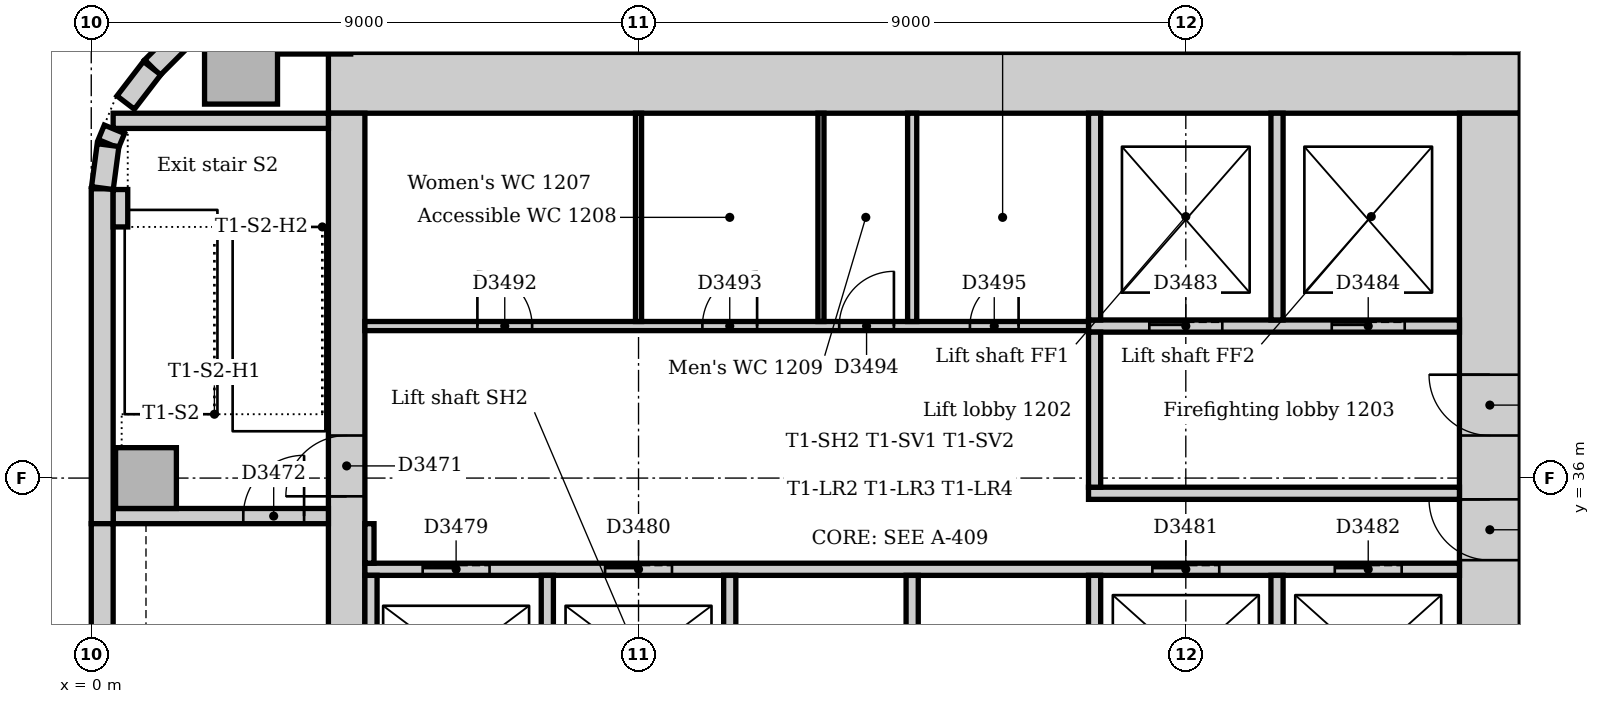
"""IFC4 building model, lengths in metres.
Left out: names, types, materials, properties, quantities, classifications, styles, units other than length and angle.
Written with IfcOpenShell. Run it as: python <this file> out.ifc"""

import sys

from ifc_helpers import new_model, si_unit, direction, frame, frame_2d, origin, origin_2d, place, context, subcontext, project, spatial, rectangle, extrude, element, fill, save


model = new_model("IFC4")
c1 = context("Model", 3, precision=1e-05, world=origin(), true_north=direction((0.0, 1.0)))
c2 = subcontext(c1, "Body", "Model", "MODEL_VIEW")
j1 = project(units=[si_unit("LENGTHUNIT", "METRE"), si_unit("PLANEANGLEUNIT", "RADIAN")], contexts=[c1])
p1 = place(None, origin())
s1 = spatial("IfcSite", under=j1, at=p1, CompositionType="ELEMENT")
p2 = place(p1, origin())
s2 = spatial("IfcBuilding", under=s1, at=p2, CompositionType="ELEMENT")
p3 = place(p2, frame((0.0, 0.0, 55.0)))
s3 = spatial("IfcBuildingStorey", under=s2, at=p3, CompositionType="ELEMENT", Elevation=55.0)
p4 = place(p3, frame((23.5, 42.5, 0.0), z_axis=(0.0, 0.0, 1.0), x_axis=(-1.0, 0.0, 0.0)))
e1 = element("IfcWall", 1, at=p4, inside=s3, PredefinedType="SOLIDWALL", context=c2, shape_type="SweptSolid", body=[
    extrude(rectangle(XDim=19.6, YDim=1.0, at=frame_2d((9.8, 0.0))), origin(), (0.0, 0.0, 1.0), 4.0),
])
p5 = place(p3, frame((23.0, 31.5, 0.0), z_axis=(0.0, 0.0, 1.0), x_axis=(0.0, 1.0, 0.0)))
e2 = element("IfcWall", 2, at=p5, inside=s3, PredefinedType="SOLIDWALL", context=c2, shape_type="SweptSolid", body=[
    extrude(rectangle(XDim=10.5, YDim=1.0, at=frame_2d((5.25, 0.0))), origin(), (0.0, 0.0, 1.0), 4.0),
])
p6 = place(p5, frame((3.15, 0.0, 0.0)))
e3 = element("IfcOpeningElement", 3, at=p6, cuts=e2, PredefinedType="OPENING", context=c2, shape_type="SweptSolid", body=[
    extrude(rectangle(XDim=1.0, YDim=2.1, at=frame_2d((0.5, 1.05))), frame((0.0, 0.51, 0.0), z_axis=(0.0, -1.0, 0.0), x_axis=(1.0, 0.0, 0.0)), (0.0, 0.0, 1.0), 1.02),
])
p7 = place(p5, frame((5.2, 0.0, 0.0)))
e4 = element("IfcOpeningElement", 4, at=p7, cuts=e2, PredefinedType="OPENING", context=c2, shape_type="SweptSolid", body=[
    extrude(rectangle(XDim=1.0, YDim=2.1, at=frame_2d((0.5, 1.05))), frame((0.0, 0.51, 0.0), z_axis=(0.0, -1.0, 0.0), x_axis=(1.0, 0.0, 0.0)), (0.0, 0.0, 1.0), 1.02),
])
p8 = place(p3, frame((4.2, 42.0, 0.0), z_axis=(0.0, 0.0, 1.0), x_axis=(0.0, -1.0, 0.0)))
e5 = element("IfcWall", 5, at=p8, inside=s3, PredefinedType="SOLIDWALL", context=c2, shape_type="SweptSolid", body=[
    extrude(rectangle(XDim=10.5, YDim=0.6, at=frame_2d((5.25, 0.0))), origin(), (0.0, 0.0, 1.0), 4.0),
])
p9 = place(p8, frame((5.3, 0.0, 0.0)))
e6 = element("IfcOpeningElement", 6, at=p9, cuts=e5, PredefinedType="OPENING", context=c2, shape_type="SweptSolid", body=[
    extrude(rectangle(XDim=1.0, YDim=2.1, at=frame_2d((0.5, 1.05))), frame((0.0, 0.31, 0.0), z_axis=(0.0, -1.0, 0.0), x_axis=(1.0, 0.0, 0.0)), (0.0, 0.0, 1.0), 0.62),
])
p10 = place(p3, frame((0.36, 35.375, 0.0), z_axis=(0.0, 0.0, 1.0), x_axis=(1.0, 0.0, 0.0)))
e7 = element("IfcWall", 7, at=p10, inside=s3, PredefinedType="SOLIDWALL", context=c2, shape_type="SweptSolid", body=[
    extrude(rectangle(XDim=3.54, YDim=0.25, at=frame_2d((1.77, 0.0))), origin(), (0.0, 0.0, 1.0), 4.0),
])
p11 = place(p10, frame((2.14, 0.0, 0.0)))
e8 = element("IfcOpeningElement", 8, at=p11, cuts=e7, PredefinedType="OPENING", context=c2, shape_type="SweptSolid", body=[
    extrude(rectangle(XDim=1.0, YDim=2.1, at=frame_2d((0.5, 1.05))), frame((0.0, 0.135, 0.0), z_axis=(0.0, -1.0, 0.0), x_axis=(1.0, 0.0, 0.0)), (0.0, 0.0, 1.0), 0.27),
])
p12 = place(p3, frame((3.9, 41.875, 0.0), z_axis=(0.0, 0.0, 1.0), x_axis=(-1.0, 0.0, 0.0)))
e9 = element("IfcWall", 9, at=p12, inside=s3, PredefinedType="SOLIDWALL", context=c2, shape_type="SweptSolid", body=[
    extrude(rectangle(XDim=3.54, YDim=0.25, at=frame_2d((1.77, 0.0))), origin(), (0.0, 0.0, 1.0), 4.0),
])
for number, where, z_axis, x_axis in (
    (10, (3.667, 43.574, 0.0), (0.0, 0.0, 1.0), (1.0, 0.0, 0.0)),
    (11, (2.463, 42.75, 0.0), (0.0, 0.0, 1.0), (1.0, 0.0, 0.0)),
):
    element("IfcColumn", number, at=place(p3, frame(where, z_axis=z_axis, x_axis=x_axis)), inside=s3, PredefinedType="COLUMN", context=c2, shape_type="SweptSolid", body=[
        extrude(rectangle(XDim=1.2, YDim=1.2, at=origin_2d()), origin(), (0.0, 0.0, 1.0), 3.85),
    ])
p13 = place(p3, frame((0.9, 36.0, 0.0), z_axis=(0.0, 0.0, 1.0), x_axis=(1.0, 0.0, 0.0)))
e12 = element("IfcColumn", 12, at=p13, inside=s3, PredefinedType="COLUMN", context=c2, shape_type="SweptSolid", body=[
    extrude(rectangle(XDim=1.0, YDim=1.0, at=origin_2d()), origin(), (0.0, 0.0, 1.0), 4.0),
])
p14 = place(p3, frame((2.249, 43.994, 0.0), z_axis=(0.0, 0.0, 1.0), x_axis=(-0.707106781187, -0.707106781187, 0.0)))
e13 = element("IfcWall", 13, at=p14, inside=s3, PredefinedType="STANDARD", context=c2, shape_type="SweptSolid", body=[
    extrude(rectangle(XDim=1.757, YDim=0.36, at=frame_2d((0.879, 0.0))), origin(), (0.0, 0.0, 1.0), 3.85),
])
p15 = place(p3, frame((0.18, 40.757, 0.0), z_axis=(0.0, 0.0, 1.0), x_axis=(0.0, -1.0, 0.0)))
e14 = element("IfcWall", 14, at=p15, inside=s3, PredefinedType="STANDARD", context=c2, shape_type="SweptSolid", body=[
    extrude(rectangle(XDim=5.507, YDim=0.36, at=frame_2d((2.754, 0.0))), origin(), (0.0, 0.0, 1.0), 3.85),
])
p16 = place(p3, frame((0.18, 35.25, 0.0), z_axis=(0.0, 0.0, 1.0), x_axis=(0.0, -1.0, 0.0)))
e15 = element("IfcWall", 15, at=p16, inside=s3, PredefinedType="STANDARD", context=c2, shape_type="SweptSolid", body=[
    extrude(rectangle(XDim=7.5, YDim=0.36, at=frame_2d((3.75, 0.0))), origin(), (0.0, 0.0, 1.0), 3.85),
])
p17 = place(p3, frame((1.0, 42.741, 0.0), z_axis=(0.0, 0.0, 1.0), x_axis=(-0.608802368033, -0.793321924995, 0.0)))
e16 = element("IfcWall", 16, at=p17, inside=s3, PredefinedType="STANDARD", context=c2, shape_type="SweptSolid", body=[
    extrude(rectangle(XDim=0.713, YDim=0.36, at=frame_2d((0.357, 0.0))), origin(), (0.0, 0.0, 1.0), 3.85),
])
p18 = place(p3, frame((0.381, 41.736, 0.0), z_axis=(0.0, 0.0, 1.0), x_axis=(-0.382773360986, -0.923842277729, 0.0)))
e17 = element("IfcWall", 17, at=p18, inside=s3, PredefinedType="STANDARD", context=c2, shape_type="SweptSolid", body=[
    extrude(rectangle(XDim=0.258, YDim=0.36, at=frame_2d((0.129, 0.0))), origin(), (0.0, 0.0, 1.0), 3.85),
])
p19 = place(p3, frame((0.276, 41.476, 0.0), z_axis=(0.0, 0.0, 1.0), x_axis=(-0.13055608231, -0.99144092581, 0.0)))
e18 = element("IfcWall", 18, at=p19, inside=s3, PredefinedType="STANDARD", context=c2, shape_type="SweptSolid", body=[
    extrude(rectangle(XDim=0.713, YDim=0.36, at=frame_2d((0.356, 0.0))), origin(), (0.0, 0.0, 1.0), 3.85),
])
p20 = place(p3, frame((0.48, 40.13, 0.0), z_axis=(0.0, 0.0, 1.0), x_axis=(0.0, 1.0, 0.0)))
e19 = element("IfcWall", 19, at=p20, inside=s3, PredefinedType="STANDARD", context=c2, shape_type="SweptSolid", body=[
    extrude(rectangle(XDim=0.615, YDim=0.24, at=frame_2d((0.307, 0.0))), origin(), (0.0, 0.0, 1.0), 4.0),
])
p21 = place(p3, frame((16.4, 35.75, 0.0), z_axis=(0.0, 0.0, 1.0), x_axis=(1.0, 0.0, 0.0)))
e20 = element("IfcWall", 20, at=p21, inside=s3, PredefinedType="PARTITIONING", context=c2, shape_type="SweptSolid", body=[
    extrude(rectangle(XDim=6.1, YDim=0.2, at=frame_2d((3.05, 0.0))), origin(), (0.0, 0.0, 1.0), 3.85),
])
p22 = place(p3, frame((16.4, 38.5, 0.0), z_axis=(0.0, 0.0, 1.0), x_axis=(1.0, 0.0, 0.0)))
e21 = element("IfcWall", 21, at=p22, inside=s3, PredefinedType="PARTITIONING", context=c2, shape_type="SweptSolid", body=[
    extrude(rectangle(XDim=6.1, YDim=0.2, at=frame_2d((3.05, 0.0))), origin(), (0.0, 0.0, 1.0), 3.85),
])
p23 = place(p22, frame((1.0, 0.0, 0.0)))
e22 = element("IfcOpeningElement", 22, at=p23, cuts=e21, PredefinedType="OPENING", context=c2, shape_type="SweptSolid", body=[
    extrude(rectangle(XDim=1.2, YDim=2.1, at=frame_2d((0.6, 1.05))), frame((0.0, 0.11, 0.0), z_axis=(0.0, -1.0, 0.0), x_axis=(1.0, 0.0, 0.0)), (0.0, 0.0, 1.0), 0.22),
])
p24 = place(p22, frame((4.0, 0.0, 0.0)))
e23 = element("IfcOpeningElement", 23, at=p24, cuts=e21, PredefinedType="OPENING", context=c2, shape_type="SweptSolid", body=[
    extrude(rectangle(XDim=1.2, YDim=2.1, at=frame_2d((0.6, 1.05))), frame((0.0, 0.11, 0.0), z_axis=(0.0, -1.0, 0.0), x_axis=(1.0, 0.0, 0.0)), (0.0, 0.0, 1.0), 0.22),
])
p25 = place(p3, frame((16.5, 35.85, 0.0), z_axis=(0.0, 0.0, 1.0), x_axis=(0.0, 1.0, 0.0)))
e24 = element("IfcWall", 24, at=p25, inside=s3, PredefinedType="PARTITIONING", context=c2, shape_type="SweptSolid", body=[
    extrude(rectangle(XDim=2.55, YDim=0.2, at=frame_2d((1.275, 0.0))), origin(), (0.0, 0.0, 1.0), 3.85),
])
p26 = place(p3, frame((4.5, 34.5, 0.0), z_axis=(0.0, 0.0, 1.0), x_axis=(1.0, 0.0, 0.0)))
e25 = element("IfcWall", 25, at=p26, inside=s3, PredefinedType="PARTITIONING", context=c2, shape_type="SweptSolid", body=[
    extrude(rectangle(XDim=18.0, YDim=0.2, at=frame_2d((9.0, 0.0))), origin(), (0.0, 0.0, 1.0), 3.85),
])
p27 = place(p26, frame((0.95, 0.0, 0.0)))
e26 = element("IfcOpeningElement", 26, at=p27, cuts=e25, PredefinedType="OPENING", context=c2, shape_type="SweptSolid", body=[
    extrude(rectangle(XDim=1.1, YDim=2.1, at=frame_2d((0.55, 1.05))), frame((0.0, 0.11, 0.0), z_axis=(0.0, -1.0, 0.0), x_axis=(1.0, 0.0, 0.0)), (0.0, 0.0, 1.0), 0.22),
])
p28 = place(p26, frame((3.95, 0.0, 0.0)))
e27 = element("IfcOpeningElement", 27, at=p28, cuts=e25, PredefinedType="OPENING", context=c2, shape_type="SweptSolid", body=[
    extrude(rectangle(XDim=1.1, YDim=2.1, at=frame_2d((0.55, 1.05))), frame((0.0, 0.11, 0.0), z_axis=(0.0, -1.0, 0.0), x_axis=(1.0, 0.0, 0.0)), (0.0, 0.0, 1.0), 0.22),
])
p29 = place(p26, frame((12.95, 0.0, 0.0)))
e28 = element("IfcOpeningElement", 28, at=p29, cuts=e25, PredefinedType="OPENING", context=c2, shape_type="SweptSolid", body=[
    extrude(rectangle(XDim=1.1, YDim=2.1, at=frame_2d((0.55, 1.05))), frame((0.0, 0.11, 0.0), z_axis=(0.0, -1.0, 0.0), x_axis=(1.0, 0.0, 0.0)), (0.0, 0.0, 1.0), 0.22),
])
p30 = place(p26, frame((15.95, 0.0, 0.0)))
e29 = element("IfcOpeningElement", 29, at=p30, cuts=e25, PredefinedType="OPENING", context=c2, shape_type="SweptSolid", body=[
    extrude(rectangle(XDim=1.1, YDim=2.1, at=frame_2d((0.55, 1.05))), frame((0.0, 0.11, 0.0), z_axis=(0.0, -1.0, 0.0), x_axis=(1.0, 0.0, 0.0)), (0.0, 0.0, 1.0), 0.22),
])
for number, where, z_axis, x_axis in (
    (30, (16.5, 38.6, 0.0), (0.0, 0.0, 1.0), (0.0, 1.0, 0.0)),
    (31, (19.5, 38.6, 0.0), (0.0, 0.0, 1.0), (0.0, 1.0, 0.0)),
):
    element("IfcWall", number, at=place(p3, frame(where, z_axis=z_axis, x_axis=x_axis)), inside=s3, PredefinedType="PARTITIONING", context=c2, shape_type="SweptSolid", body=[
        extrude(rectangle(XDim=3.4, YDim=0.2, at=frame_2d((1.7, 0.0))), origin(), (0.0, 0.0, 1.0), 3.85),
    ])
for number, where, z_axis, x_axis in (
    (32, (4.6, 31.75, 0.0), (0.0, 0.0, 1.0), (0.0, 1.0, 0.0)),
    (33, (7.5, 31.75, 0.0), (0.0, 0.0, 1.0), (0.0, 1.0, 0.0)),
    (34, (10.5, 31.75, 0.0), (0.0, 0.0, 1.0), (0.0, 1.0, 0.0)),
    (35, (13.5, 31.75, 0.0), (0.0, 0.0, 1.0), (0.0, 1.0, 0.0)),
    (36, (16.5, 31.75, 0.0), (0.0, 0.0, 1.0), (0.0, 1.0, 0.0)),
    (37, (19.5, 31.75, 0.0), (0.0, 0.0, 1.0), (0.0, 1.0, 0.0)),
):
    element("IfcWall", number, at=place(p3, frame(where, z_axis=z_axis, x_axis=x_axis)), inside=s3, PredefinedType="PARTITIONING", context=c2, shape_type="SweptSolid", body=[
        extrude(rectangle(XDim=2.65, YDim=0.2, at=frame_2d((1.325, 0.0))), origin(), (0.0, 0.0, 1.0), 3.85),
    ])
p31 = place(p3, frame((4.5, 38.5, 0.0), z_axis=(0.0, 0.0, 1.0), x_axis=(1.0, 0.0, 0.0)))
e38 = element("IfcWall", 38, at=p31, inside=s3, PredefinedType="PARTITIONING", context=c2, shape_type="SweptSolid", body=[
    extrude(rectangle(XDim=11.9, YDim=0.15, at=frame_2d((5.95, 0.0))), origin(), (0.0, 0.0, 1.0), 3.85),
])
p32 = place(p31, frame((1.85, 0.0, 0.0)))
e39 = element("IfcOpeningElement", 39, at=p32, cuts=e38, PredefinedType="OPENING", context=c2, shape_type="SweptSolid", body=[
    extrude(rectangle(XDim=0.9, YDim=2.1, at=frame_2d((0.45, 1.05))), frame((0.0, 0.085, 0.0), z_axis=(0.0, -1.0, 0.0), x_axis=(1.0, 0.0, 0.0)), (0.0, 0.0, 1.0), 0.17),
])
p33 = place(p31, frame((5.55, 0.0, 0.0)))
e40 = element("IfcOpeningElement", 40, at=p33, cuts=e38, PredefinedType="OPENING", context=c2, shape_type="SweptSolid", body=[
    extrude(rectangle(XDim=0.9, YDim=2.1, at=frame_2d((0.45, 1.05))), frame((0.0, 0.085, 0.0), z_axis=(0.0, -1.0, 0.0), x_axis=(1.0, 0.0, 0.0)), (0.0, 0.0, 1.0), 0.17),
])
p34 = place(p31, frame((7.8, 0.0, 0.0)))
e41 = element("IfcOpeningElement", 41, at=p34, cuts=e38, PredefinedType="OPENING", context=c2, shape_type="SweptSolid", body=[
    extrude(rectangle(XDim=0.9, YDim=2.1, at=frame_2d((0.45, 1.05))), frame((0.0, 0.085, 0.0), z_axis=(0.0, -1.0, 0.0), x_axis=(1.0, 0.0, 0.0)), (0.0, 0.0, 1.0), 0.17),
])
p35 = place(p31, frame((9.95, 0.0, 0.0)))
e42 = element("IfcOpeningElement", 42, at=p35, cuts=e38, PredefinedType="OPENING", context=c2, shape_type="SweptSolid", body=[
    extrude(rectangle(XDim=0.8, YDim=2.1, at=frame_2d((0.4, 1.05))), frame((0.0, 0.085, 0.0), z_axis=(0.0, -1.0, 0.0), x_axis=(1.0, 0.0, 0.0)), (0.0, 0.0, 1.0), 0.17),
])
p36 = place(p3, frame((4.575, 34.6, 0.0), z_axis=(0.0, 0.0, 1.0), x_axis=(0.0, 1.0, 0.0)))
e43 = element("IfcWall", 43, at=p36, inside=s3, PredefinedType="PARTITIONING", context=c2, shape_type="SweptSolid", body=[
    extrude(rectangle(XDim=0.65, YDim=0.15, at=frame_2d((0.325, 0.0))), origin(), (0.0, 0.0, 1.0), 3.85),
])
p37 = place(p3, frame((13.5, 38.575, 0.0), z_axis=(0.0, 0.0, 1.0), x_axis=(0.0, 1.0, 0.0)))
e44 = element("IfcWall", 44, at=p37, inside=s3, PredefinedType="PARTITIONING", context=c2, shape_type="SweptSolid", body=[
    extrude(rectangle(XDim=3.425, YDim=0.15, at=frame_2d((1.712, 0.0))), origin(), (0.0, 0.0, 1.0), 3.85),
])
for number, where, z_axis, x_axis in (
    (45, (9.0, 38.575, 0.0), (0.0, 0.0, 1.0), (0.0, 1.0, 0.0)),
    (46, (12.0, 38.575, 0.0), (0.0, 0.0, 1.0), (0.0, 1.0, 0.0)),
):
    element("IfcWall", number, at=place(p3, frame(where, z_axis=z_axis, x_axis=x_axis)), inside=s3, PredefinedType="PARTITIONING", context=c2, shape_type="SweptSolid", body=[
        extrude(rectangle(XDim=3.425, YDim=0.1, at=frame_2d((1.712, 0.0))), origin(), (0.0, 0.0, 1.0), 3.85),
    ])
p38 = place(p9, frame((1.0, 0.0, 0.0), z_axis=(0.0, 0.0, 1.0), x_axis=(-1.0, 0.0, 0.0)))
e47 = element("IfcDoor", 47, at=p38, inside=s3, OperationType="SINGLE_SWING_LEFT", PredefinedType="DOOR", context=c2, shape_type="SweptSolid", body=[
    extrude(rectangle(XDim=1.0, YDim=2.1, at=frame_2d((0.5, 1.05))), frame((0.0, 0.025, 0.0), z_axis=(0.0, -1.0, 0.0), x_axis=(1.0, 0.0, 0.0)), (0.0, 0.0, 1.0), 0.05),
])
fill(e6, e47)
p39 = place(p11, origin())
e48 = element("IfcDoor", 48, at=p39, inside=s3, OperationType="SINGLE_SWING_RIGHT", PredefinedType="DOOR", context=c2, shape_type="SweptSolid", body=[
    extrude(rectangle(XDim=1.0, YDim=2.1, at=frame_2d((0.5, 1.05))), frame((0.0, 0.025, 0.0), z_axis=(0.0, -1.0, 0.0), x_axis=(1.0, 0.0, 0.0)), (0.0, 0.0, 1.0), 0.05),
])
fill(e8, e48)
p40 = place(p27, origin())
e49 = element("IfcDoor", 49, at=p40, inside=s3, OperationType="SLIDING_TO_LEFT", PredefinedType="DOOR", context=c2, shape_type="SweptSolid", body=[
    extrude(rectangle(XDim=1.1, YDim=2.1, at=frame_2d((0.55, 1.05))), frame((0.0, 0.025, 0.0), z_axis=(0.0, -1.0, 0.0), x_axis=(1.0, 0.0, 0.0)), (0.0, 0.0, 1.0), 0.05),
])
fill(e26, e49)
p41 = place(p28, origin())
e50 = element("IfcDoor", 50, at=p41, inside=s3, OperationType="SLIDING_TO_LEFT", PredefinedType="DOOR", context=c2, shape_type="SweptSolid", body=[
    extrude(rectangle(XDim=1.1, YDim=2.1, at=frame_2d((0.55, 1.05))), frame((0.0, 0.025, 0.0), z_axis=(0.0, -1.0, 0.0), x_axis=(1.0, 0.0, 0.0)), (0.0, 0.0, 1.0), 0.05),
])
fill(e27, e50)
p42 = place(p29, origin())
e51 = element("IfcDoor", 51, at=p42, inside=s3, OperationType="SLIDING_TO_LEFT", PredefinedType="DOOR", context=c2, shape_type="SweptSolid", body=[
    extrude(rectangle(XDim=1.1, YDim=2.1, at=frame_2d((0.55, 1.05))), frame((0.0, 0.025, 0.0), z_axis=(0.0, -1.0, 0.0), x_axis=(1.0, 0.0, 0.0)), (0.0, 0.0, 1.0), 0.05),
])
fill(e28, e51)
p43 = place(p30, origin())
e52 = element("IfcDoor", 52, at=p43, inside=s3, OperationType="SLIDING_TO_LEFT", PredefinedType="DOOR", context=c2, shape_type="SweptSolid", body=[
    extrude(rectangle(XDim=1.1, YDim=2.1, at=frame_2d((0.55, 1.05))), frame((0.0, 0.025, 0.0), z_axis=(0.0, -1.0, 0.0), x_axis=(1.0, 0.0, 0.0)), (0.0, 0.0, 1.0), 0.05),
])
fill(e29, e52)
p44 = place(p23, origin())
e53 = element("IfcDoor", 53, at=p44, inside=s3, OperationType="SLIDING_TO_LEFT", PredefinedType="DOOR", context=c2, shape_type="SweptSolid", body=[
    extrude(rectangle(XDim=1.2, YDim=2.1, at=frame_2d((0.6, 1.05))), frame((0.0, 0.025, 0.0), z_axis=(0.0, -1.0, 0.0), x_axis=(1.0, 0.0, 0.0)), (0.0, 0.0, 1.0), 0.05),
])
fill(e22, e53)
p45 = place(p24, origin())
e54 = element("IfcDoor", 54, at=p45, inside=s3, OperationType="SLIDING_TO_LEFT", PredefinedType="DOOR", context=c2, shape_type="SweptSolid", body=[
    extrude(rectangle(XDim=1.2, YDim=2.1, at=frame_2d((0.6, 1.05))), frame((0.0, 0.025, 0.0), z_axis=(0.0, -1.0, 0.0), x_axis=(1.0, 0.0, 0.0)), (0.0, 0.0, 1.0), 0.05),
])
fill(e23, e54)
p46 = place(p6, origin())
e55 = element("IfcDoor", 55, at=p46, inside=s3, OperationType="SINGLE_SWING_RIGHT", PredefinedType="DOOR", context=c2, shape_type="SweptSolid", body=[
    extrude(rectangle(XDim=1.0, YDim=2.1, at=frame_2d((0.5, 1.05))), frame((0.0, 0.025, 0.0), z_axis=(0.0, -1.0, 0.0), x_axis=(1.0, 0.0, 0.0)), (0.0, 0.0, 1.0), 0.05),
])
fill(e3, e55)
p47 = place(p7, origin())
e56 = element("IfcDoor", 56, at=p47, inside=s3, OperationType="SINGLE_SWING_RIGHT", PredefinedType="DOOR", context=c2, shape_type="SweptSolid", body=[
    extrude(rectangle(XDim=1.0, YDim=2.1, at=frame_2d((0.5, 1.05))), frame((0.0, 0.025, 0.0), z_axis=(0.0, -1.0, 0.0), x_axis=(1.0, 0.0, 0.0)), (0.0, 0.0, 1.0), 0.05),
])
fill(e4, e56)
p48 = place(p32, origin())
e57 = element("IfcDoor", 57, at=p48, inside=s3, OperationType="SINGLE_SWING_LEFT", PredefinedType="DOOR", context=c2, shape_type="SweptSolid", body=[
    extrude(rectangle(XDim=0.9, YDim=2.1, at=frame_2d((0.45, 1.05))), frame((0.0, 0.025, 0.0), z_axis=(0.0, -1.0, 0.0), x_axis=(1.0, 0.0, 0.0)), (0.0, 0.0, 1.0), 0.05),
])
fill(e39, e57)
p49 = place(p33, origin())
e58 = element("IfcDoor", 58, at=p49, inside=s3, OperationType="SINGLE_SWING_RIGHT", PredefinedType="DOOR", context=c2, shape_type="SweptSolid", body=[
    extrude(rectangle(XDim=0.9, YDim=2.1, at=frame_2d((0.45, 1.05))), frame((0.0, 0.025, 0.0), z_axis=(0.0, -1.0, 0.0), x_axis=(1.0, 0.0, 0.0)), (0.0, 0.0, 1.0), 0.05),
])
fill(e40, e58)
p50 = place(p34, origin())
e59 = element("IfcDoor", 59, at=p50, inside=s3, OperationType="SINGLE_SWING_RIGHT", PredefinedType="DOOR", context=c2, shape_type="SweptSolid", body=[
    extrude(rectangle(XDim=0.9, YDim=2.1, at=frame_2d((0.45, 1.05))), frame((0.0, 0.025, 0.0), z_axis=(0.0, -1.0, 0.0), x_axis=(1.0, 0.0, 0.0)), (0.0, 0.0, 1.0), 0.05),
])
fill(e41, e59)
p51 = place(p35, origin())
e60 = element("IfcDoor", 60, at=p51, inside=s3, OperationType="SINGLE_SWING_RIGHT", PredefinedType="DOOR", context=c2, shape_type="SweptSolid", body=[
    extrude(rectangle(XDim=0.8, YDim=2.1, at=frame_2d((0.4, 1.05))), frame((0.0, 0.025, 0.0), z_axis=(0.0, -1.0, 0.0), x_axis=(1.0, 0.0, 0.0)), (0.0, 0.0, 1.0), 0.05),
])
fill(e42, e60)
save(model, sys.argv[1])
